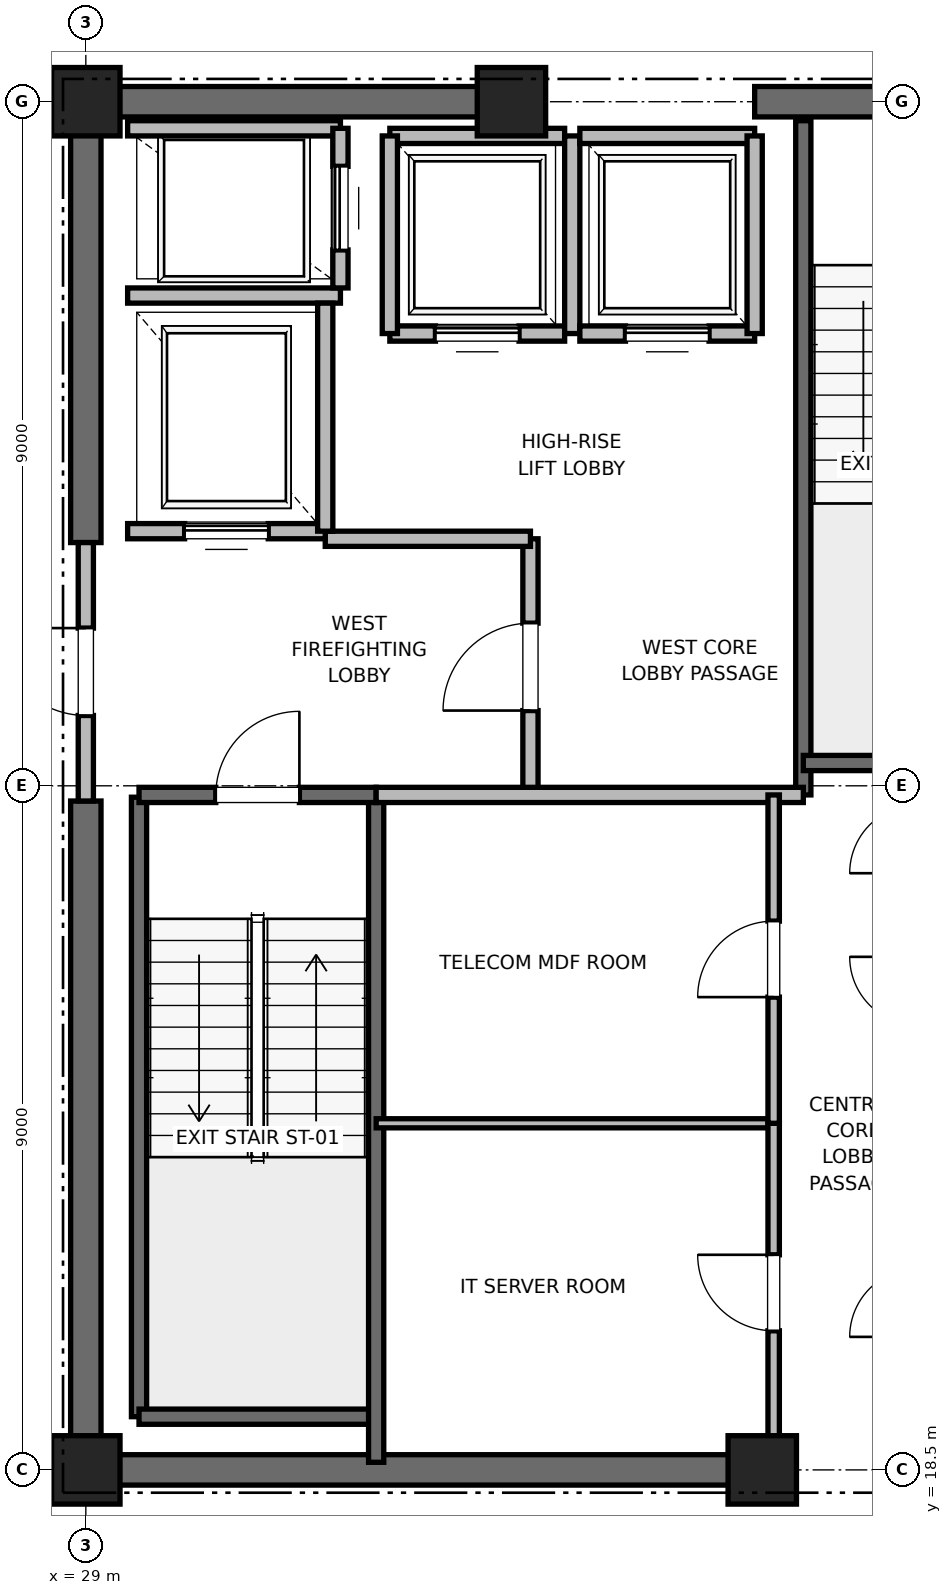
"""IFC4 building model, lengths in metres.
Left out: names, types, materials, properties, quantities, classifications, styles, units other than length and angle.
Written with IfcOpenShell. Run it as: python <this file> out.ifc"""

import sys

from ifc_helpers import new_model, si_unit, direction, frame, frame_2d, origin, origin_2d, place, context, subcontext, project, spatial, rectangle, extrude, element, fill, save


model = new_model("IFC4")
c1 = context("Model", 3, precision=1e-05, world=origin(), true_north=direction((0.0, 1.0)))
c2 = subcontext(c1, "Body", "Model", "MODEL_VIEW")
j1 = project(units=[si_unit("LENGTHUNIT", "METRE"), si_unit("PLANEANGLEUNIT", "RADIAN")], contexts=[c1])
p1 = place(None, origin())
s1 = spatial("IfcSite", under=j1, at=p1, CompositionType="ELEMENT")
p2 = place(p1, origin())
s2 = spatial("IfcBuilding", under=s1, at=p2, CompositionType="ELEMENT")
p3 = place(p2, frame((0.0, 0.0, 338.8)))
s3 = spatial("IfcBuildingStorey", under=s2, at=p3, CompositionType="ELEMENT", Elevation=338.8)
for number, where, z_axis, x_axis in (
    (1, (29.0, 18.5, 0.0), (0.0, 0.0, 1.0), (1.0, 0.0, 0.0)),
    (2, (29.0, 36.5, 0.0), (0.0, 0.0, 1.0), (1.0, 0.0, 0.0)),
    (3, (37.9, 18.5, 0.0), (0.0, 0.0, 1.0), (1.0, 0.0, 0.0)),
    (4, (34.6, 36.5, 0.0), (0.0, 0.0, 1.0), (1.0, 0.0, 0.0)),
):
    element("IfcColumn", number, at=place(p3, frame(where, z_axis=z_axis, x_axis=x_axis)), inside=s3, PredefinedType="PILASTER", context=c2, shape_type="SweptSolid", body=[
        extrude(rectangle(XDim=0.9, YDim=0.9, at=origin_2d()), origin(), (0.0, 0.0, 1.0), 4.0),
    ])
p4 = place(p3, frame((29.0, 18.5, 0.0), z_axis=(0.0, 0.0, 1.0), x_axis=(1.0, 0.0, 0.0)))
e5 = element("IfcWall", 5, at=p4, inside=s3, PredefinedType="SHEAR", context=c2, shape_type="SweptSolid", body=[
    extrude(rectangle(XDim=9.2, YDim=0.4, at=frame_2d((4.6, 0.0))), origin(), (0.0, 0.0, 1.0), 3.7),
])
p5 = place(p3, frame((29.0, 36.5, 0.0), z_axis=(0.0, 0.0, 1.0), x_axis=(1.0, 0.0, 0.0)))
e6 = element("IfcWall", 6, at=p5, inside=s3, PredefinedType="SHEAR", context=c2, shape_type="SweptSolid", body=[
    extrude(rectangle(XDim=5.8, YDim=0.4, at=frame_2d((2.9, 0.0))), origin(), (0.0, 0.0, 1.0), 3.7),
])
p6 = place(p3, frame((37.8, 36.5, 0.0), z_axis=(0.0, 0.0, 1.0), x_axis=(1.0, 0.0, 0.0)))
e7 = element("IfcWall", 7, at=p6, inside=s3, PredefinedType="SHEAR", context=c2, shape_type="SweptSolid", body=[
    extrude(rectangle(XDim=4.4, YDim=0.4, at=frame_2d((2.2, 0.0))), origin(), (0.0, 0.0, 1.0), 3.7),
])
p7 = place(p6, frame((1.65, 0.0, 0.0)))
e8 = element("IfcOpeningElement", 8, at=p7, cuts=e7, PredefinedType="OPENING", context=c2, shape_type="SweptSolid", body=[
    extrude(rectangle(XDim=1.1, YDim=2.15, at=frame_2d((0.55, 1.075))), frame((0.0, 0.2, 0.0), z_axis=(0.0, -1.0, 0.0), x_axis=(1.0, 0.0, 0.0)), (0.0, 0.0, 1.0), 0.4),
])
p8 = place(p3, frame((29.0, 18.5, 0.0), z_axis=(0.0, 0.0, 1.0), x_axis=(0.0, 1.0, 0.0)))
e9 = element("IfcWall", 9, at=p8, inside=s3, PredefinedType="SHEAR", context=c2, shape_type="SweptSolid", body=[
    extrude(rectangle(XDim=8.8, YDim=0.4, at=frame_2d((4.4, 0.0))), origin(), (0.0, 0.0, 1.0), 3.7),
])
p9 = place(p3, frame((29.0, 30.7, 0.0), z_axis=(0.0, 0.0, 1.0), x_axis=(0.0, 1.0, 0.0)))
e10 = element("IfcWall", 10, at=p9, inside=s3, PredefinedType="SHEAR", context=c2, shape_type="SweptSolid", body=[
    extrude(rectangle(XDim=5.8, YDim=0.4, at=frame_2d((2.9, 0.0))), origin(), (0.0, 0.0, 1.0), 3.7),
])
p10 = place(p3, frame((29.7, 19.2, 0.0), z_axis=(0.0, 0.0, 1.0), x_axis=(0.0, 1.0, 0.0)))
e11 = element("IfcWall", 11, at=p10, inside=s3, PredefinedType="SOLIDWALL", context=c2, shape_type="SweptSolid", body=[
    extrude(rectangle(XDim=8.15, YDim=0.2, at=frame_2d((4.075, 0.0))), origin(), (0.0, 0.0, 1.0), 3.7),
])
p11 = place(p3, frame((29.7, 19.2, 0.0), z_axis=(0.0, 0.0, 1.0), x_axis=(1.0, 0.0, 0.0)))
e12 = element("IfcWall", 12, at=p11, inside=s3, PredefinedType="SOLIDWALL", context=c2, shape_type="SweptSolid", body=[
    extrude(rectangle(XDim=3.12, YDim=0.2, at=frame_2d((1.56, 0.0))), origin(), (0.0, 0.0, 1.0), 3.7),
])
p12 = place(p3, frame((32.82, 18.6, 0.0), z_axis=(0.0, 0.0, 1.0), x_axis=(0.0, 1.0, 0.0)))
e13 = element("IfcWall", 13, at=p12, inside=s3, PredefinedType="SOLIDWALL", context=c2, shape_type="SweptSolid", body=[
    extrude(rectangle(XDim=8.78, YDim=0.2, at=frame_2d((4.39, 0.0))), origin(), (0.0, 0.0, 1.0), 3.7),
])
p13 = place(p3, frame((29.7, 27.38, 0.0), z_axis=(0.0, 0.0, 1.0), x_axis=(1.0, 0.0, 0.0)))
e14 = element("IfcWall", 14, at=p13, inside=s3, PredefinedType="SOLIDWALL", context=c2, shape_type="SweptSolid", body=[
    extrude(rectangle(XDim=3.12, YDim=0.2, at=frame_2d((1.56, 0.0))), origin(), (0.0, 0.0, 1.0), 3.7),
])
p14 = place(p13, frame((1.01, 0.0, 0.0)))
e15 = element("IfcOpeningElement", 15, at=p14, cuts=e14, PredefinedType="OPENING", context=c2, shape_type="SweptSolid", body=[
    extrude(rectangle(XDim=1.1, YDim=2.15, at=frame_2d((0.55, 1.075))), frame((0.0, 0.1, 0.0), z_axis=(0.0, -1.0, 0.0), x_axis=(1.0, 0.0, 0.0)), (0.0, 0.0, 1.0), 0.2),
])
p15 = place(p3, frame((38.44, 27.38, 0.0), z_axis=(0.0, 0.0, 1.0), x_axis=(0.0, 1.0, 0.0)))
e16 = element("IfcWall", 16, at=p15, inside=s3, PredefinedType="SOLIDWALL", context=c2, shape_type="SweptSolid", body=[
    extrude(rectangle(XDim=8.87, YDim=0.2, at=frame_2d((4.435, 0.0))), origin(), (0.0, 0.0, 1.0), 3.7),
])
p16 = place(p3, frame((38.44, 27.8, 0.0), z_axis=(0.0, 0.0, 1.0), x_axis=(1.0, 0.0, 0.0)))
e17 = element("IfcWall", 17, at=p16, inside=s3, PredefinedType="SOLIDWALL", context=c2, shape_type="SweptSolid", body=[
    extrude(rectangle(XDim=3.32, YDim=0.2, at=frame_2d((1.66, 0.0))), origin(), (0.0, 0.0, 1.0), 3.7),
])
p17 = place(p3, frame((34.85, 27.38, 0.0), z_axis=(0.0, 0.0, 1.0), x_axis=(0.0, 1.0, 0.0)))
e18 = element("IfcWall", 18, at=p17, inside=s3, PredefinedType="PARTITIONING", context=c2, shape_type="SweptSolid", body=[
    extrude(rectangle(XDim=3.37, YDim=0.2, at=frame_2d((1.685, 0.0))), origin(), (0.0, 0.0, 1.0), 3.7),
])
p18 = place(p17, frame((1.11, 0.0, 0.0)))
e19 = element("IfcOpeningElement", 19, at=p18, cuts=e18, PredefinedType="OPENING", context=c2, shape_type="SweptSolid", body=[
    extrude(rectangle(XDim=1.15, YDim=2.2, at=frame_2d((0.575, 1.1))), frame((0.0, 0.1, 0.0), z_axis=(0.0, -1.0, 0.0), x_axis=(1.0, 0.0, 0.0)), (0.0, 0.0, 1.0), 0.2),
])
p19 = place(p3, frame((29.0, 27.3, 0.0), z_axis=(0.0, 0.0, 1.0), x_axis=(0.0, 1.0, 0.0)))
e20 = element("IfcWall", 20, at=p19, inside=s3, PredefinedType="PARTITIONING", context=c2, shape_type="SweptSolid", body=[
    extrude(rectangle(XDim=3.4, YDim=0.2, at=frame_2d((1.7, 0.0))), origin(), (0.0, 0.0, 1.0), 2.78),
])
p20 = place(p19, frame((1.125, 0.0, 0.0)))
e21 = element("IfcOpeningElement", 21, at=p20, cuts=e20, PredefinedType="OPENING", context=c2, shape_type="SweptSolid", body=[
    extrude(rectangle(XDim=1.15, YDim=2.2, at=frame_2d((0.575, 1.1))), frame((0.0, 0.1, 0.0), z_axis=(0.0, -1.0, 0.0), x_axis=(1.0, 0.0, 0.0)), (0.0, 0.0, 1.0), 0.2),
])
p21 = place(p3, frame((32.82, 27.38, 0.0), z_axis=(0.0, 0.0, 1.0), x_axis=(1.0, 0.0, 0.0)))
e22 = element("IfcWall", 22, at=p21, inside=s3, PredefinedType="PARTITIONING", context=c2, shape_type="SweptSolid", body=[
    extrude(rectangle(XDim=5.62, YDim=0.2, at=frame_2d((2.81, 0.0))), origin(), (0.0, 0.0, 1.0), 3.7),
])
p22 = place(p3, frame((32.15, 30.75, 0.0), z_axis=(0.0, 0.0, 1.0), x_axis=(1.0, 0.0, 0.0)))
e23 = element("IfcWall", 23, at=p22, inside=s3, PredefinedType="PARTITIONING", context=c2, shape_type="SweptSolid", body=[
    extrude(rectangle(XDim=2.7, YDim=0.2, at=frame_2d((1.35, 0.0))), origin(), (0.0, 0.0, 1.0), 3.7),
])
p23 = place(p3, frame((29.55, 30.85, 0.0), z_axis=(0.0, 0.0, 1.0), x_axis=(1.0, 0.0, 0.0)))
e24 = element("IfcWall", 24, at=p23, inside=s3, PredefinedType="SOLIDWALL", context=c2, shape_type="SweptSolid", body=[
    extrude(rectangle(XDim=2.6, YDim=0.2, at=frame_2d((1.3, 0.0))), origin(), (0.0, 0.0, 1.0), 2.78),
])
p24 = place(p23, frame((0.75, 0.0, 0.0)))
e25 = element("IfcOpeningElement", 25, at=p24, cuts=e24, PredefinedType="OPENING", context=c2, shape_type="SweptSolid", body=[
    extrude(rectangle(XDim=1.1, YDim=2.2, at=frame_2d((0.55, 1.1))), frame((0.0, 0.1, 0.0), z_axis=(0.0, -1.0, 0.0), x_axis=(1.0, 0.0, 0.0)), (0.0, 0.0, 1.0), 0.2),
])
p25 = place(p3, frame((29.55, 33.95, 0.0), z_axis=(0.0, 0.0, 1.0), x_axis=(1.0, 0.0, 0.0)))
e26 = element("IfcWall", 26, at=p25, inside=s3, PredefinedType="SOLIDWALL", context=c2, shape_type="SweptSolid", body=[
    extrude(rectangle(XDim=2.8, YDim=0.2, at=frame_2d((1.4, 0.0))), origin(), (0.0, 0.0, 1.0), 3.7),
])
p26 = place(p3, frame((32.15, 30.85, 0.0), z_axis=(0.0, 0.0, 1.0), x_axis=(0.0, 1.0, 0.0)))
e27 = element("IfcWall", 27, at=p26, inside=s3, PredefinedType="SOLIDWALL", context=c2, shape_type="SweptSolid", body=[
    extrude(rectangle(XDim=3.0, YDim=0.2, at=frame_2d((1.5, 0.0))), origin(), (0.0, 0.0, 1.0), 3.7),
])
p27 = place(p3, frame((32.35, 36.15, 0.0), z_axis=(0.0, 0.0, 1.0), x_axis=(-1.0, 0.0, 0.0)))
e28 = element("IfcWall", 28, at=p27, inside=s3, PredefinedType="SOLIDWALL", context=c2, shape_type="SweptSolid", body=[
    extrude(rectangle(XDim=2.8, YDim=0.2, at=frame_2d((1.4, 0.0))), origin(), (0.0, 0.0, 1.0), 2.753),
])
p28 = place(p3, frame((32.35, 34.05, 0.0), z_axis=(0.0, 0.0, 1.0), x_axis=(0.0, 1.0, 0.0)))
e29 = element("IfcWall", 29, at=p28, inside=s3, PredefinedType="SOLIDWALL", context=c2, shape_type="SweptSolid", body=[
    extrude(rectangle(XDim=2.1, YDim=0.2, at=frame_2d((1.05, 0.0))), origin(), (0.0, 0.0, 1.0), 3.7),
])
p29 = place(p28, frame((0.5, 0.0, 0.0)))
e30 = element("IfcOpeningElement", 30, at=p29, cuts=e29, PredefinedType="OPENING", context=c2, shape_type="SweptSolid", body=[
    extrude(rectangle(XDim=1.1, YDim=2.2, at=frame_2d((0.55, 1.1))), frame((0.0, 0.1, 0.0), z_axis=(0.0, -1.0, 0.0), x_axis=(1.0, 0.0, 0.0)), (0.0, 0.0, 1.0), 0.2),
])
p30 = place(p3, frame((33.0, 33.45, 0.0), z_axis=(0.0, 0.0, 1.0), x_axis=(1.0, 0.0, 0.0)))
e31 = element("IfcWall", 31, at=p30, inside=s3, PredefinedType="SOLIDWALL", context=c2, shape_type="SweptSolid", body=[
    extrude(rectangle(XDim=2.3, YDim=0.2, at=frame_2d((1.15, 0.0))), origin(), (0.0, 0.0, 1.0), 3.7),
])
p31 = place(p30, frame((0.6, 0.0, 0.0)))
e32 = element("IfcOpeningElement", 32, at=p31, cuts=e31, PredefinedType="OPENING", context=c2, shape_type="SweptSolid", body=[
    extrude(rectangle(XDim=1.1, YDim=2.2, at=frame_2d((0.55, 1.1))), frame((0.0, 0.1, 0.0), z_axis=(0.0, -1.0, 0.0), x_axis=(1.0, 0.0, 0.0)), (0.0, 0.0, 1.0), 0.2),
])
p32 = place(p3, frame((35.3, 36.05, 0.0), z_axis=(0.0, 0.0, 1.0), x_axis=(-1.0, 0.0, 0.0)))
e33 = element("IfcWall", 33, at=p32, inside=s3, PredefinedType="SOLIDWALL", context=c2, shape_type="SweptSolid", body=[
    extrude(rectangle(XDim=2.3, YDim=0.2, at=frame_2d((1.15, 0.0))), origin(), (0.0, 0.0, 1.0), 2.78),
])
p33 = place(p3, frame((33.0, 36.05, 0.0), z_axis=(0.0, 0.0, 1.0), x_axis=(0.0, -1.0, 0.0)))
e34 = element("IfcWall", 34, at=p33, inside=s3, PredefinedType="SOLIDWALL", context=c2, shape_type="SweptSolid", body=[
    extrude(rectangle(XDim=2.6, YDim=0.2, at=frame_2d((1.3, 0.0))), origin(), (0.0, 0.0, 1.0), 3.7),
])
p34 = place(p3, frame((35.4, 33.45, 0.0), z_axis=(0.0, 0.0, 1.0), x_axis=(0.0, 1.0, 0.0)))
e35 = element("IfcWall", 35, at=p34, inside=s3, PredefinedType="SOLIDWALL", context=c2, shape_type="SweptSolid", body=[
    extrude(rectangle(XDim=2.6, YDim=0.2, at=frame_2d((1.3, 0.0))), origin(), (0.0, 0.0, 1.0), 2.78),
])
p35 = place(p3, frame((35.5, 33.45, 0.0), z_axis=(0.0, 0.0, 1.0), x_axis=(1.0, 0.0, 0.0)))
e36 = element("IfcWall", 36, at=p35, inside=s3, PredefinedType="SOLIDWALL", context=c2, shape_type="SweptSolid", body=[
    extrude(rectangle(XDim=2.3, YDim=0.2, at=frame_2d((1.15, 0.0))), origin(), (0.0, 0.0, 1.0), 3.7),
])
p36 = place(p35, frame((0.6, 0.0, 0.0)))
e37 = element("IfcOpeningElement", 37, at=p36, cuts=e36, PredefinedType="OPENING", context=c2, shape_type="SweptSolid", body=[
    extrude(rectangle(XDim=1.1, YDim=2.2, at=frame_2d((0.55, 1.1))), frame((0.0, 0.1, 0.0), z_axis=(0.0, -1.0, 0.0), x_axis=(1.0, 0.0, 0.0)), (0.0, 0.0, 1.0), 0.2),
])
p37 = place(p3, frame((37.8, 36.05, 0.0), z_axis=(0.0, 0.0, 1.0), x_axis=(-1.0, 0.0, 0.0)))
e38 = element("IfcWall", 38, at=p37, inside=s3, PredefinedType="SOLIDWALL", context=c2, shape_type="SweptSolid", body=[
    extrude(rectangle(XDim=2.3, YDim=0.2, at=frame_2d((1.15, 0.0))), origin(), (0.0, 0.0, 1.0), 2.78),
])
p38 = place(p3, frame((37.8, 33.45, 0.0), z_axis=(0.0, 0.0, 1.0), x_axis=(0.0, 1.0, 0.0)))
e39 = element("IfcWall", 39, at=p38, inside=s3, PredefinedType="SOLIDWALL", context=c2, shape_type="SweptSolid", body=[
    extrude(rectangle(XDim=2.6, YDim=0.2, at=frame_2d((1.3, 0.0))), origin(), (0.0, 0.0, 1.0), 2.78),
])
p39 = place(p3, frame((32.82, 23.06, 0.0), z_axis=(0.0, 0.0, 1.0), x_axis=(1.0, 0.0, 0.0)))
e40 = element("IfcWall", 40, at=p39, inside=s3, PredefinedType="PARTITIONING", context=c2, shape_type="SweptSolid", body=[
    extrude(rectangle(XDim=5.23, YDim=0.12, at=frame_2d((2.615, 0.0))), origin(), (0.0, 0.0, 1.0), 2.85),
])
p40 = place(p3, frame((38.05, 18.6, 0.0), z_axis=(0.0, 0.0, 1.0), x_axis=(0.0, 1.0, 0.0)))
e41 = element("IfcWall", 41, at=p40, inside=s3, PredefinedType="PARTITIONING", context=c2, shape_type="SweptSolid", body=[
    extrude(rectangle(XDim=4.46, YDim=0.15, at=frame_2d((2.23, 0.0))), origin(), (0.0, 0.0, 1.0), 2.78),
])
p41 = place(p40, frame((1.73, 0.0, 0.0)))
e42 = element("IfcOpeningElement", 42, at=p41, cuts=e41, PredefinedType="OPENING", context=c2, shape_type="SweptSolid", body=[
    extrude(rectangle(XDim=1.0, YDim=2.15, at=frame_2d((0.5, 1.075))), frame((0.0, 0.075, 0.0), z_axis=(0.0, -1.0, 0.0), x_axis=(1.0, 0.0, 0.0)), (0.0, 0.0, 1.0), 0.15),
])
p42 = place(p3, frame((38.05, 23.06, 0.0), z_axis=(0.0, 0.0, 1.0), x_axis=(0.0, 1.0, 0.0)))
e43 = element("IfcWall", 43, at=p42, inside=s3, PredefinedType="PARTITIONING", context=c2, shape_type="SweptSolid", body=[
    extrude(rectangle(XDim=4.32, YDim=0.15, at=frame_2d((2.16, 0.0))), origin(), (0.0, 0.0, 1.0), 2.85),
])
p43 = place(p42, frame((1.66, 0.0, 0.0)))
e44 = element("IfcOpeningElement", 44, at=p43, cuts=e43, PredefinedType="OPENING", context=c2, shape_type="SweptSolid", body=[
    extrude(rectangle(XDim=1.0, YDim=2.15, at=frame_2d((0.5, 1.075))), frame((0.0, 0.075, 0.0), z_axis=(0.0, -1.0, 0.0), x_axis=(1.0, 0.0, 0.0)), (0.0, 0.0, 1.0), 0.15),
])
p44 = place(p14, origin())
e45 = element("IfcDoor", 45, at=p44, inside=s3, OperationType="SINGLE_SWING_RIGHT", PredefinedType="DOOR", context=c2, shape_type="SweptSolid", body=[
    extrude(rectangle(XDim=1.1, YDim=2.15, at=frame_2d((0.55, 1.075))), frame((0.0, 0.025, 0.0), z_axis=(0.0, -1.0, 0.0), x_axis=(1.0, 0.0, 0.0)), (0.0, 0.0, 1.0), 0.05),
])
fill(e15, e45)
p45 = place(p18, origin())
e46 = element("IfcDoor", 46, at=p45, inside=s3, OperationType="SINGLE_SWING_LEFT", PredefinedType="DOOR", context=c2, shape_type="SweptSolid", body=[
    extrude(rectangle(XDim=1.15, YDim=2.2, at=frame_2d((0.575, 1.1))), frame((0.0, 0.025, 0.0), z_axis=(0.0, -1.0, 0.0), x_axis=(1.0, 0.0, 0.0)), (0.0, 0.0, 1.0), 0.05),
])
fill(e19, e46)
p46 = place(p20, origin())
e47 = element("IfcDoor", 47, at=p46, inside=s3, OperationType="SINGLE_SWING_RIGHT", PredefinedType="DOOR", context=c2, shape_type="SweptSolid", body=[
    extrude(rectangle(XDim=1.15, YDim=2.2, at=frame_2d((0.575, 1.1))), frame((0.0, 0.025, 0.0), z_axis=(0.0, -1.0, 0.0), x_axis=(1.0, 0.0, 0.0)), (0.0, 0.0, 1.0), 0.05),
])
fill(e21, e47)
p47 = place(p24, origin())
e48 = element("IfcDoor", 48, at=p47, inside=s3, OperationType="SLIDING_TO_RIGHT", PredefinedType="DOOR", context=c2, shape_type="SweptSolid", body=[
    extrude(rectangle(XDim=1.1, YDim=2.2, at=frame_2d((0.55, 1.1))), frame((0.0, 0.025, 0.0), z_axis=(0.0, -1.0, 0.0), x_axis=(1.0, 0.0, 0.0)), (0.0, 0.0, 1.0), 0.05),
])
fill(e25, e48)
p48 = place(p29, origin())
e49 = element("IfcDoor", 49, at=p48, inside=s3, OperationType="SLIDING_TO_RIGHT", PredefinedType="DOOR", context=c2, shape_type="SweptSolid", body=[
    extrude(rectangle(XDim=1.1, YDim=2.2, at=frame_2d((0.55, 1.1))), frame((0.0, 0.025, 0.0), z_axis=(0.0, -1.0, 0.0), x_axis=(1.0, 0.0, 0.0)), (0.0, 0.0, 1.0), 0.05),
])
fill(e30, e49)
p49 = place(p31, origin())
e50 = element("IfcDoor", 50, at=p49, inside=s3, OperationType="SLIDING_TO_RIGHT", PredefinedType="DOOR", context=c2, shape_type="SweptSolid", body=[
    extrude(rectangle(XDim=1.1, YDim=2.2, at=frame_2d((0.55, 1.1))), frame((0.0, 0.025, 0.0), z_axis=(0.0, -1.0, 0.0), x_axis=(1.0, 0.0, 0.0)), (0.0, 0.0, 1.0), 0.05),
])
fill(e32, e50)
p50 = place(p36, origin())
e51 = element("IfcDoor", 51, at=p50, inside=s3, OperationType="SLIDING_TO_RIGHT", PredefinedType="DOOR", context=c2, shape_type="SweptSolid", body=[
    extrude(rectangle(XDim=1.1, YDim=2.2, at=frame_2d((0.55, 1.1))), frame((0.0, 0.025, 0.0), z_axis=(0.0, -1.0, 0.0), x_axis=(1.0, 0.0, 0.0)), (0.0, 0.0, 1.0), 0.05),
])
fill(e37, e51)
p51 = place(p41, origin())
e52 = element("IfcDoor", 52, at=p51, inside=s3, OperationType="SINGLE_SWING_RIGHT", PredefinedType="DOOR", context=c2, shape_type="SweptSolid", body=[
    extrude(rectangle(XDim=1.0, YDim=2.15, at=frame_2d((0.5, 1.075))), frame((0.0, 0.025, 0.0), z_axis=(0.0, -1.0, 0.0), x_axis=(1.0, 0.0, 0.0)), (0.0, 0.0, 1.0), 0.05),
])
fill(e42, e52)
p52 = place(p43, origin())
e53 = element("IfcDoor", 53, at=p52, inside=s3, OperationType="SINGLE_SWING_LEFT", PredefinedType="DOOR", context=c2, shape_type="SweptSolid", body=[
    extrude(rectangle(XDim=1.0, YDim=2.15, at=frame_2d((0.5, 1.075))), frame((0.0, 0.025, 0.0), z_axis=(0.0, -1.0, 0.0), x_axis=(1.0, 0.0, 0.0)), (0.0, 0.0, 1.0), 0.05),
])
fill(e44, e53)
save(model, sys.argv[1])
